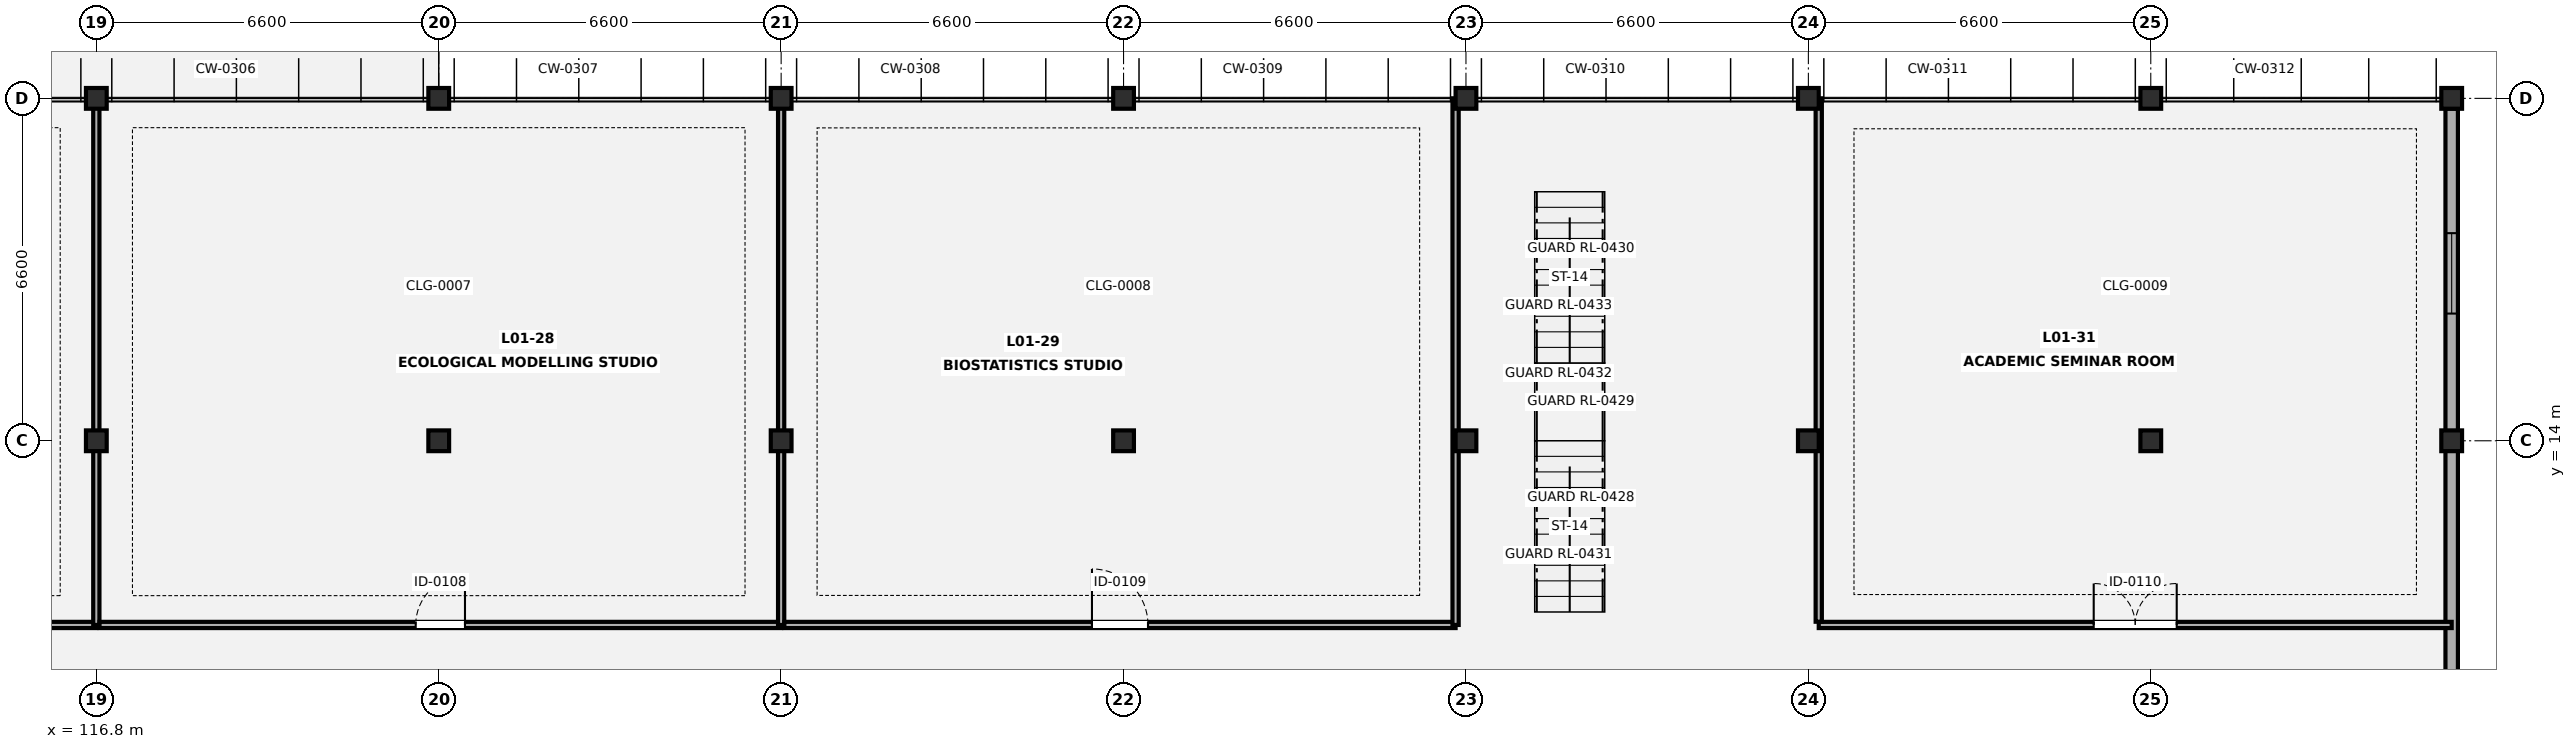
"""IFC4 building model, lengths in metres.
Left out: names, types, materials, properties, quantities, classifications, styles, units other than length and angle.
Written with IfcOpenShell. Run it as: python <this file> out.ifc"""

import sys

from ifc_helpers import new_model, si_unit, direction, frame, frame_2d, origin, origin_2d, place, context, subcontext, project, spatial, rectangle, i_section, extrude, element, fill, save


model = new_model("IFC4")
c1 = context("Model", 3, precision=1e-05, world=origin(), true_north=direction((0.0, 1.0)))
c2 = subcontext(c1, "Body", "Model", "MODEL_VIEW")
j1 = project(units=[si_unit("LENGTHUNIT", "METRE"), si_unit("PLANEANGLEUNIT", "RADIAN")], contexts=[c1])
p1 = place(None, origin())
s1 = spatial("IfcSite", under=j1, at=p1, CompositionType="ELEMENT")
p2 = place(p1, origin())
s2 = spatial("IfcBuilding", under=s1, at=p2, CompositionType="ELEMENT")
p3 = place(p2, frame((0.0, 0.0, 4.9)))
s3 = spatial("IfcBuildingStorey", under=s2, at=p3, CompositionType="ELEMENT", Elevation=4.9)
for number, where, z_axis, x_axis in (
    (1, (116.8, 14.0, 0.0), (0.0, 0.0, 1.0), (1.0, 0.0, 0.0)),
    (2, (116.8, 20.6, 0.0), (0.0, 0.0, 1.0), (1.0, 0.0, 0.0)),
    (3, (123.4, 14.0, 0.0), (0.0, 0.0, 1.0), (1.0, 0.0, 0.0)),
    (4, (123.4, 20.6, 0.0), (0.0, 0.0, 1.0), (1.0, 0.0, 0.0)),
    (5, (130.0, 14.0, 0.0), (0.0, 0.0, 1.0), (1.0, 0.0, 0.0)),
    (6, (130.0, 20.6, 0.0), (0.0, 0.0, 1.0), (1.0, 0.0, 0.0)),
    (7, (136.6, 14.0, 0.0), (0.0, 0.0, 1.0), (1.0, 0.0, 0.0)),
    (8, (136.6, 20.6, 0.0), (0.0, 0.0, 1.0), (1.0, 0.0, 0.0)),
    (9, (143.2, 14.0, 0.0), (0.0, 0.0, 1.0), (1.0, 0.0, 0.0)),
    (10, (143.2, 20.6, 0.0), (0.0, 0.0, 1.0), (1.0, 0.0, 0.0)),
    (11, (149.8, 14.0, 0.0), (0.0, 0.0, 1.0), (1.0, 0.0, 0.0)),
    (12, (149.8, 20.6, 0.0), (0.0, 0.0, 1.0), (1.0, 0.0, 0.0)),
    (13, (156.4, 14.0, 0.0), (0.0, 0.0, 1.0), (1.0, 0.0, 0.0)),
    (14, (156.4, 20.6, 0.0), (0.0, 0.0, 1.0), (1.0, 0.0, 0.0)),
    (15, (162.2, 14.0, 0.0), (0.0, 0.0, 1.0), (1.0, 0.0, 0.0)),
    (16, (162.2, 20.6, 0.0), (0.0, 0.0, 1.0), (1.0, 0.0, 0.0)),
):
    element("IfcColumn", number, at=place(p3, frame(where, z_axis=z_axis, x_axis=x_axis)), inside=s3, PredefinedType="COLUMN", context=c2, shape_type="SweptSolid", body=[
        extrude(i_section(OverallWidth=0.4, OverallDepth=0.4, WebThickness=0.02, FlangeThickness=0.035, FilletRadius=0.016, at=origin_2d()), origin(), (0.0, 0.0, 1.0), 4.2),
    ])
p4 = place(p3, frame((162.2, 20.402, 0.0), z_axis=(0.0, 0.0, 1.0), x_axis=(0.0, -1.0, 0.0)))
e17 = element("IfcWall", 17, at=p4, inside=s3, PredefinedType="SOLIDWALL", context=c2, shape_type="SweptSolid", body=[
    extrude(rectangle(XDim=19.404, YDim=0.24, at=frame_2d((9.702, 0.0))), origin(), (0.0, 0.0, 1.0), 3.372),
])
p5 = place(p4, frame((2.4, 0.0, 0.85)))
e18 = element("IfcOpeningElement", 18, at=p5, cuts=e17, PredefinedType="OPENING", context=c2, shape_type="SweptSolid", body=[
    extrude(rectangle(XDim=1.55, YDim=1.4, at=frame_2d((0.775, 0.7))), frame((0.0, 0.13, 0.0), z_axis=(0.0, -1.0, 0.0), x_axis=(1.0, 0.0, 0.0)), (0.0, 0.0, 1.0), 0.26),
])
p6 = place(p4, frame((15.1, 0.0, 0.85)))
e19 = element("IfcOpeningElement", 19, at=p6, cuts=e17, PredefinedType="OPENING", context=c2, shape_type="SweptSolid", body=[
    extrude(rectangle(XDim=1.95, YDim=1.5, at=frame_2d((0.975, 0.75))), frame((0.0, 0.13, 0.0), z_axis=(0.0, -1.0, 0.0), x_axis=(1.0, 0.0, 0.0)), (0.0, 0.0, 1.0), 0.26),
])
p7 = place(p3, frame((103.6, 10.45, 0.0), z_axis=(0.0, 0.0, 1.0), x_axis=(1.0, 0.0, 0.0)))
e20 = element("IfcWall", 20, at=p7, inside=s3, PredefinedType="PARTITIONING", context=c2, shape_type="SweptSolid", body=[
    extrude(rectangle(XDim=13.2, YDim=0.12, at=frame_2d((6.6, 0.0))), origin(), (0.0, 0.0, 1.0), 3.546),
])
p8 = place(p7, frame((6.06, 0.0, 0.0)))
e21 = element("IfcOpeningElement", 21, at=p8, cuts=e20, PredefinedType="OPENING", context=c2, shape_type="SweptSolid", body=[
    extrude(rectangle(XDim=1.08, YDim=2.12, at=frame_2d((0.54, 1.06))), frame((0.0, 0.07, 0.0), z_axis=(0.0, -1.0, 0.0), x_axis=(1.0, 0.0, 0.0)), (0.0, 0.0, 1.0), 0.14),
])
p9 = place(p3, frame((116.8, 10.45, 0.0), z_axis=(0.0, 0.0, 1.0), x_axis=(0.0, 1.0, 0.0)))
e22 = element("IfcWall", 22, at=p9, inside=s3, PredefinedType="PARTITIONING", context=c2, shape_type="SweptSolid", body=[
    extrude(rectangle(XDim=10.15, YDim=0.12, at=frame_2d((5.075, 0.0))), origin(), (0.0, 0.0, 1.0), 3.372),
])
p10 = place(p3, frame((116.862, 10.45, 0.0), z_axis=(0.0, 0.0, 1.0), x_axis=(1.0, 0.0, 0.0)))
e23 = element("IfcWall", 23, at=p10, inside=s3, PredefinedType="PARTITIONING", context=c2, shape_type="SweptSolid", body=[
    extrude(rectangle(XDim=13.138, YDim=0.12, at=frame_2d((6.569, 0.0))), origin(), (0.0, 0.0, 1.0), 3.546),
])
p11 = place(p10, frame((6.094, 0.0, 0.0)))
e24 = element("IfcOpeningElement", 24, at=p11, cuts=e23, PredefinedType="OPENING", context=c2, shape_type="SweptSolid", body=[
    extrude(rectangle(XDim=0.95, YDim=2.1, at=frame_2d((0.475, 1.05))), frame((0.0, 0.07, 0.0), z_axis=(0.0, -1.0, 0.0), x_axis=(1.0, 0.0, 0.0)), (0.0, 0.0, 1.0), 0.14),
])
p12 = place(p3, frame((130.0, 10.45, 0.0), z_axis=(0.0, 0.0, 1.0), x_axis=(0.0, 1.0, 0.0)))
e25 = element("IfcWall", 25, at=p12, inside=s3, PredefinedType="PARTITIONING", context=c2, shape_type="SweptSolid", body=[
    extrude(rectangle(XDim=10.15, YDim=0.12, at=frame_2d((5.075, 0.0))), origin(), (0.0, 0.0, 1.0), 3.372),
])
p13 = place(p3, frame((130.062, 10.45, 0.0), z_axis=(0.0, 0.0, 1.0), x_axis=(1.0, 0.0, 0.0)))
e26 = element("IfcWall", 26, at=p13, inside=s3, PredefinedType="PARTITIONING", context=c2, shape_type="SweptSolid", body=[
    extrude(rectangle(XDim=12.938, YDim=0.12, at=frame_2d((6.469, 0.0))), origin(), (0.0, 0.0, 1.0), 3.546),
])
p14 = place(p13, frame((5.929, 0.0, 0.0)))
e27 = element("IfcOpeningElement", 27, at=p14, cuts=e26, PredefinedType="OPENING", context=c2, shape_type="SweptSolid", body=[
    extrude(rectangle(XDim=1.08, YDim=2.12, at=frame_2d((0.54, 1.06))), frame((0.0, 0.07, 0.0), z_axis=(0.0, -1.0, 0.0), x_axis=(1.0, 0.0, 0.0)), (0.0, 0.0, 1.0), 0.14),
])
p15 = place(p3, frame((143.0, 10.45, 0.0), z_axis=(0.0, 0.0, 1.0), x_axis=(0.0, 1.0, 0.0)))
e28 = element("IfcWall", 28, at=p15, inside=s3, PredefinedType="PARTITIONING", context=c2, shape_type="SweptSolid", body=[
    extrude(rectangle(XDim=10.15, YDim=0.12, at=frame_2d((5.075, 0.0))), origin(), (0.0, 0.0, 1.0), 3.372),
])
p16 = place(p3, frame((150.0, 10.45, 0.0), z_axis=(0.0, 0.0, 1.0), x_axis=(1.0, 0.0, 0.0)))
e29 = element("IfcWall", 29, at=p16, inside=s3, PredefinedType="PARTITIONING", context=c2, shape_type="SweptSolid", body=[
    extrude(rectangle(XDim=12.2, YDim=0.12, at=frame_2d((6.1, 0.0))), origin(), (0.0, 0.0, 1.0), 3.546),
])
p17 = place(p16, frame((5.3, 0.0, 0.0)))
e30 = element("IfcOpeningElement", 30, at=p17, cuts=e29, PredefinedType="OPENING", context=c2, shape_type="SweptSolid", body=[
    extrude(rectangle(XDim=1.6, YDim=2.18, at=frame_2d((0.8, 1.09))), frame((0.0, 0.07, 0.0), z_axis=(0.0, -1.0, 0.0), x_axis=(1.0, 0.0, 0.0)), (0.0, 0.0, 1.0), 0.14),
])
p18 = place(p3, frame((150.0, 10.512, 0.0), z_axis=(0.0, 0.0, 1.0), x_axis=(0.0, 1.0, 0.0)))
e31 = element("IfcWall", 31, at=p18, inside=s3, PredefinedType="PARTITIONING", context=c2, shape_type="SweptSolid", body=[
    extrude(rectangle(XDim=10.088, YDim=0.12, at=frame_2d((5.044, 0.0))), origin(), (0.0, 0.0, 1.0), 3.372),
])
p19 = place(p5, origin())
e32 = element("IfcWindow", 32, at=p19, inside=s3, PartitioningType="SINGLE_PANEL", PredefinedType="WINDOW", context=c2, shape_type="SweptSolid", body=[
    extrude(rectangle(XDim=1.55, YDim=1.4, at=frame_2d((0.775, 0.7))), frame((0.0, 0.03, 0.0), z_axis=(0.0, -1.0, 0.0), x_axis=(1.0, 0.0, 0.0)), (0.0, 0.0, 1.0), 0.06),
])
fill(e18, e32)
p20 = place(p11, origin())
e33 = element("IfcDoor", 33, at=p20, inside=s3, OperationType="SINGLE_SWING_RIGHT", PredefinedType="DOOR", context=c2, shape_type="SweptSolid", body=[
    extrude(rectangle(XDim=0.95, YDim=2.1, at=frame_2d((0.475, 1.05))), frame((0.0, 0.025, 0.0), z_axis=(0.0, -1.0, 0.0), x_axis=(1.0, 0.0, 0.0)), (0.0, 0.0, 1.0), 0.05),
])
fill(e24, e33)
p21 = place(p14, origin())
e34 = element("IfcDoor", 34, at=p21, inside=s3, OperationType="SINGLE_SWING_LEFT", PredefinedType="DOOR", context=c2, shape_type="SweptSolid", body=[
    extrude(rectangle(XDim=1.08, YDim=2.12, at=frame_2d((0.54, 1.06))), frame((0.0, 0.025, 0.0), z_axis=(0.0, -1.0, 0.0), x_axis=(1.0, 0.0, 0.0)), (0.0, 0.0, 1.0), 0.05),
])
fill(e27, e34)
p22 = place(p17, origin())
e35 = element("IfcDoor", 35, at=p22, inside=s3, OperationType="DOUBLE_DOOR_SINGLE_SWING", PredefinedType="DOOR", context=c2, shape_type="SweptSolid", body=[
    extrude(rectangle(XDim=1.6, YDim=2.18, at=frame_2d((0.8, 1.09))), frame((0.0, 0.025, 0.0), z_axis=(0.0, -1.0, 0.0), x_axis=(1.0, 0.0, 0.0)), (0.0, 0.0, 1.0), 0.05),
])
fill(e30, e35)
save(model, sys.argv[1])
